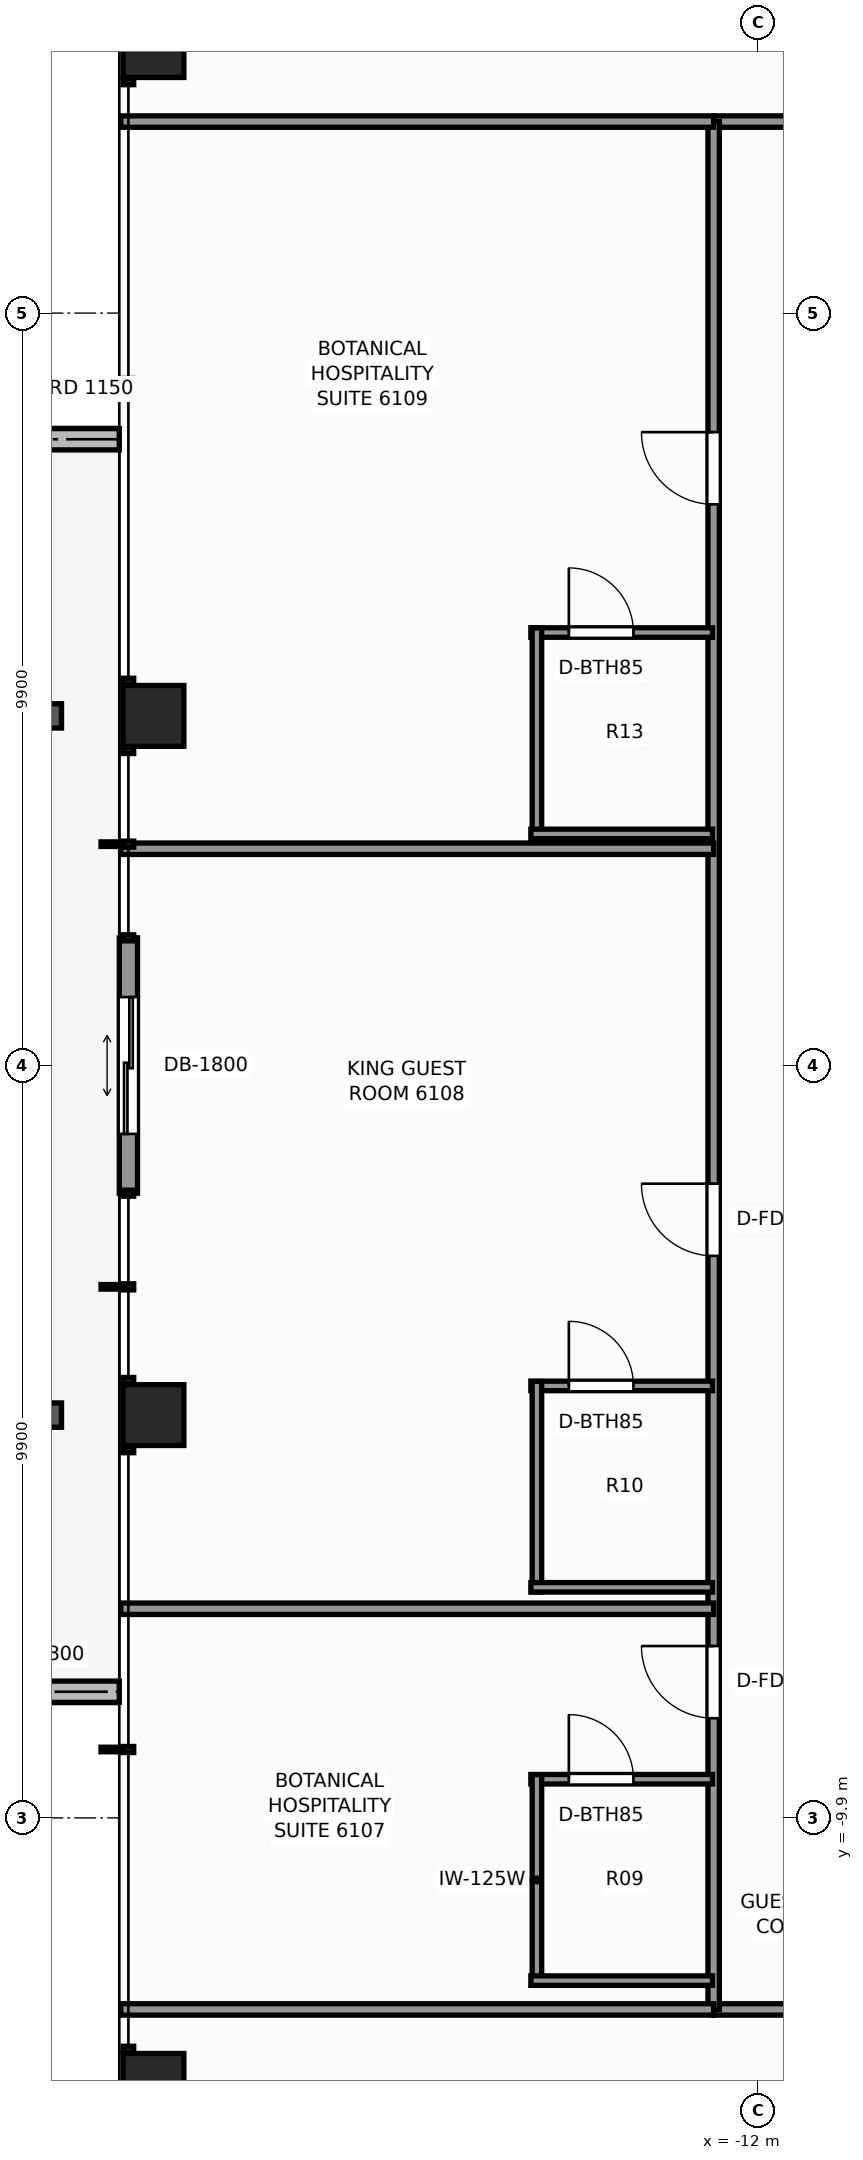
"""IFC4 building model, lengths in metres.
Left out: names, types, materials, properties, quantities, classifications, styles, units other than length and angle.
Written with IfcOpenShell. Run it as: python <this file> out.ifc"""

import sys

from ifc_helpers import new_model, si_unit, direction, frame, frame_2d, origin, origin_2d, place, context, subcontext, project, spatial, rectangle, extrude, element, fill, save


model = new_model("IFC4")
c1 = context("Model", 3, precision=1e-05, world=origin(), true_north=direction((0.0, 1.0)))
c2 = subcontext(c1, "Body", "Model", "MODEL_VIEW")
j1 = project(units=[si_unit("LENGTHUNIT", "METRE"), si_unit("PLANEANGLEUNIT", "RADIAN")], contexts=[c1])
p1 = place(None, origin())
s1 = spatial("IfcSite", under=j1, at=p1, CompositionType="ELEMENT")
p2 = place(p1, origin())
s2 = spatial("IfcBuilding", under=s1, at=p2, CompositionType="ELEMENT")
p3 = place(p2, frame((0.0, 0.0, 209.7)))
s3 = spatial("IfcBuildingStorey", under=s2, at=p3, CompositionType="ELEMENT", Elevation=209.7)
for number, where, z_axis, x_axis in (
    (1, (-19.95, -13.4, 0.0), (0.0, 0.0, 1.0), (1.0, 0.0, 0.0)),
    (2, (-19.95, -4.6, 0.0), (0.0, 0.0, 1.0), (1.0, 0.0, 0.0)),
    (3, (-19.95, 4.6, 0.0), (0.0, 0.0, 1.0), (1.0, 0.0, 0.0)),
    (4, (-19.95, 13.4, 0.0), (0.0, 0.0, 1.0), (1.0, 0.0, 0.0)),
):
    element("IfcColumn", number, at=place(p3, frame(where, z_axis=z_axis, x_axis=x_axis)), inside=s3, PredefinedType="COLUMN", context=c2, shape_type="SweptSolid", body=[
        extrude(rectangle(XDim=0.8, YDim=0.8, at=origin_2d()), origin(), (0.0, 0.0, 1.0), 3.3),
    ])
p4 = place(p3, frame((-22.406, -8.24, -0.04), z_axis=(0.0, 0.0, 1.0), x_axis=(1.0, 0.0, 0.0)))
e5 = element("IfcWall", 5, at=p4, inside=s3, PredefinedType="PARAPET", context=c2, shape_type="SweptSolid", body=[
    extrude(rectangle(XDim=2.006, YDim=0.28, at=frame_2d((1.003, 0.0))), origin(), (0.0, 0.0, 1.0), 0.42),
])
p5 = place(p3, frame((-20.4, 8.24, -0.04), z_axis=(0.0, 0.0, 1.0), x_axis=(-1.0, 0.0, 0.0)))
e6 = element("IfcWall", 6, at=p5, inside=s3, PredefinedType="PARAPET", context=c2, shape_type="SweptSolid", body=[
    extrude(rectangle(XDim=1.26, YDim=0.28, at=frame_2d((0.63, 0.0))), origin(), (0.0, 0.0, 1.0), 0.42),
])
p6 = place(p3, frame((-20.28, -1.68, 0.0), z_axis=(0.0, 0.0, 1.0), x_axis=(0.0, 1.0, 0.0)))
e7 = element("IfcWall", 7, at=p6, inside=s3, PredefinedType="STANDARD", context=c2, shape_type="SweptSolid", body=[
    extrude(rectangle(XDim=3.36, YDim=0.24, at=frame_2d((1.68, 0.0))), origin(), (0.0, 0.0, 1.0), 3.08),
])
p7 = place(p6, frame((0.78, 0.0, 0.0)))
e8 = element("IfcOpeningElement", 8, at=p7, cuts=e7, PredefinedType="OPENING", context=c2, shape_type="SweptSolid", body=[
    extrude(rectangle(XDim=1.8, YDim=2.2, at=frame_2d((0.9, 1.1))), frame((0.0, 0.13, 0.0), z_axis=(0.0, -1.0, 0.0), x_axis=(1.0, 0.0, 0.0)), (0.0, 0.0, 1.0), 0.26),
])
p8 = place(p3, frame((-12.58, -12.42, 0.0), z_axis=(0.0, 0.0, 1.0), x_axis=(1.0, 0.0, 0.0)))
e9 = element("IfcWall", 9, at=p8, inside=s3, PredefinedType="PARTITIONING", context=c2, shape_type="SweptSolid", body=[
    extrude(rectangle(XDim=25.16, YDim=0.15, at=frame_2d((12.58, 0.0))), origin(), (0.0, 0.0, 1.0), 2.369),
])
p9 = place(p8, frame((4.595, 0.0, 0.0)))
e10 = element("IfcOpeningElement", 10, at=p9, cuts=e9, PredefinedType="OPENING", context=c2, shape_type="SweptSolid", body=[
    extrude(rectangle(XDim=0.9, YDim=2.06, at=frame_2d((0.45, 1.03))), frame((0.0, 0.085, 0.0), z_axis=(0.0, -1.0, 0.0), x_axis=(1.0, 0.0, 0.0)), (0.0, 0.0, 1.0), 0.17),
])
p10 = place(p8, frame((10.1, 0.0, 0.0)))
e11 = element("IfcOpeningElement", 11, at=p10, cuts=e9, PredefinedType="OPENING", context=c2, shape_type="SweptSolid", body=[
    extrude(rectangle(XDim=0.9, YDim=2.06, at=frame_2d((0.45, 1.03))), frame((0.0, 0.085, 0.0), z_axis=(0.0, -1.0, 0.0), x_axis=(1.0, 0.0, 0.0)), (0.0, 0.0, 1.0), 0.17),
])
p11 = place(p8, frame((20.079, 0.0, 0.0)))
e12 = element("IfcOpeningElement", 12, at=p11, cuts=e9, PredefinedType="OPENING", context=c2, shape_type="SweptSolid", body=[
    extrude(rectangle(XDim=0.9, YDim=2.06, at=frame_2d((0.45, 1.03))), frame((0.0, 0.085, 0.0), z_axis=(0.0, -1.0, 0.0), x_axis=(1.0, 0.0, 0.0)), (0.0, 0.0, 1.0), 0.17),
])
p12 = place(p3, frame((-12.58, 12.42, 0.0), z_axis=(0.0, 0.0, 1.0), x_axis=(1.0, 0.0, 0.0)))
e13 = element("IfcWall", 13, at=p12, inside=s3, PredefinedType="PARTITIONING", context=c2, shape_type="SweptSolid", body=[
    extrude(rectangle(XDim=25.16, YDim=0.15, at=frame_2d((12.58, 0.0))), origin(), (0.0, 0.0, 1.0), 2.369),
])
p13 = place(p12, frame((4.443, 0.0, 0.0)))
e14 = element("IfcOpeningElement", 14, at=p13, cuts=e13, PredefinedType="OPENING", context=c2, shape_type="SweptSolid", body=[
    extrude(rectangle(XDim=0.9, YDim=2.06, at=frame_2d((0.45, 1.03))), frame((0.0, 0.085, 0.0), z_axis=(0.0, -1.0, 0.0), x_axis=(1.0, 0.0, 0.0)), (0.0, 0.0, 1.0), 0.17),
])
p14 = place(p12, frame((14.135, 0.0, 0.0)))
e15 = element("IfcOpeningElement", 15, at=p14, cuts=e13, PredefinedType="OPENING", context=c2, shape_type="SweptSolid", body=[
    extrude(rectangle(XDim=0.95, YDim=2.06, at=frame_2d((0.475, 1.03))), frame((0.0, 0.085, 0.0), z_axis=(0.0, -1.0, 0.0), x_axis=(1.0, 0.0, 0.0)), (0.0, 0.0, 1.0), 0.17),
])
p15 = place(p12, frame((19.817, 0.0, 0.0)))
e16 = element("IfcOpeningElement", 16, at=p15, cuts=e13, PredefinedType="OPENING", context=c2, shape_type="SweptSolid", body=[
    extrude(rectangle(XDim=0.9, YDim=2.06, at=frame_2d((0.45, 1.03))), frame((0.0, 0.085, 0.0), z_axis=(0.0, -1.0, 0.0), x_axis=(1.0, 0.0, 0.0)), (0.0, 0.0, 1.0), 0.17),
])
p16 = place(p3, frame((-12.58, -12.42, 0.0), z_axis=(0.0, 0.0, 1.0), x_axis=(0.0, 1.0, 0.0)))
e17 = element("IfcWall", 17, at=p16, inside=s3, PredefinedType="PARTITIONING", context=c2, shape_type="SweptSolid", body=[
    extrude(rectangle(XDim=24.84, YDim=0.15, at=frame_2d((12.42, 0.0))), origin(), (0.0, 0.0, 1.0), 2.369),
])
p17 = place(p16, frame((3.831, 0.0, 0.0)))
e18 = element("IfcOpeningElement", 18, at=p17, cuts=e17, PredefinedType="OPENING", context=c2, shape_type="SweptSolid", body=[
    extrude(rectangle(XDim=0.95, YDim=2.06, at=frame_2d((0.475, 1.03))), frame((0.0, 0.085, 0.0), z_axis=(0.0, -1.0, 0.0), x_axis=(1.0, 0.0, 0.0)), (0.0, 0.0, 1.0), 0.17),
])
p18 = place(p16, frame((9.915, 0.0, 0.0)))
e19 = element("IfcOpeningElement", 19, at=p18, cuts=e17, PredefinedType="OPENING", context=c2, shape_type="SweptSolid", body=[
    extrude(rectangle(XDim=0.95, YDim=2.06, at=frame_2d((0.475, 1.03))), frame((0.0, 0.085, 0.0), z_axis=(0.0, -1.0, 0.0), x_axis=(1.0, 0.0, 0.0)), (0.0, 0.0, 1.0), 0.17),
])
p19 = place(p16, frame((19.803, 0.0, 0.0)))
e20 = element("IfcOpeningElement", 20, at=p19, cuts=e17, PredefinedType="OPENING", context=c2, shape_type="SweptSolid", body=[
    extrude(rectangle(XDim=0.95, YDim=2.06, at=frame_2d((0.475, 1.03))), frame((0.0, 0.085, 0.0), z_axis=(0.0, -1.0, 0.0), x_axis=(1.0, 0.0, 0.0)), (0.0, 0.0, 1.0), 0.17),
])
for number, where, z_axis, x_axis in (
    (21, (-20.38, -12.42, 0.0), (0.0, 0.0, 1.0), (1.0, 0.0, 0.0)),
    (22, (-20.38, 12.42, 0.0), (0.0, 0.0, 1.0), (1.0, 0.0, 0.0)),
):
    element("IfcWall", number, at=place(p3, frame(where, z_axis=z_axis, x_axis=x_axis)), inside=s3, PredefinedType="PARTITIONING", context=c2, shape_type="SweptSolid", body=[
        extrude(rectangle(XDim=7.8, YDim=0.15, at=frame_2d((3.9, 0.0))), origin(), (0.0, 0.0, 1.0), 2.369),
    ])
p20 = place(p3, frame((-20.38, -7.148, 0.0), z_axis=(0.0, 0.0, 1.0), x_axis=(1.0, 0.0, 0.0)))
e23 = element("IfcWall", 23, at=p20, inside=s3, PredefinedType="PARTITIONING", context=c2, shape_type="SweptSolid", body=[
    extrude(rectangle(XDim=7.8, YDim=0.15, at=frame_2d((3.9, 0.0))), origin(), (0.0, 0.0, 1.0), 2.453),
])
p21 = place(p3, frame((-14.985, -9.391, 0.0), z_axis=(0.0, 0.0, 1.0), x_axis=(1.0, 0.0, 0.0)))
e24 = element("IfcWall", 24, at=p21, inside=s3, PredefinedType="PARTITIONING", context=c2, shape_type="SweptSolid", body=[
    extrude(rectangle(XDim=2.39, YDim=0.125, at=frame_2d((1.195, 0.0))), origin(), (0.0, 0.0, 1.0), 3.08),
])
p22 = place(p21, frame((0.5, 0.0, 0.0)))
e25 = element("IfcOpeningElement", 25, at=p22, cuts=e24, PredefinedType="OPENING", context=c2, shape_type="SweptSolid", body=[
    extrude(rectangle(XDim=0.85, YDim=2.03, at=frame_2d((0.425, 1.015))), frame((0.0, 0.073, 0.0), z_axis=(0.0, -1.0, 0.0), x_axis=(1.0, 0.0, 0.0)), (0.0, 0.0, 1.0), 0.145),
])
p23 = place(p3, frame((-14.905, -12.101, 0.0), z_axis=(0.0, 0.0, 1.0), x_axis=(0.0, 1.0, 0.0)))
e26 = element("IfcWall", 26, at=p23, inside=s3, PredefinedType="PARTITIONING", context=c2, shape_type="SweptSolid", body=[
    extrude(rectangle(XDim=2.77, YDim=0.125, at=frame_2d((1.385, 0.0))), origin(), (0.0, 0.0, 1.0), 2.369),
])
p24 = place(p3, frame((-14.985, -12.041, 0.0), z_axis=(0.0, 0.0, 1.0), x_axis=(1.0, 0.0, 0.0)))
e27 = element("IfcWall", 27, at=p24, inside=s3, PredefinedType="PARTITIONING", context=c2, shape_type="SweptSolid", body=[
    extrude(rectangle(XDim=2.39, YDim=0.125, at=frame_2d((1.195, 0.0))), origin(), (0.0, 0.0, 1.0), 3.08),
])
p25 = place(p3, frame((-20.38, 2.852, 0.0), z_axis=(0.0, 0.0, 1.0), x_axis=(1.0, 0.0, 0.0)))
e28 = element("IfcWall", 28, at=p25, inside=s3, PredefinedType="PARTITIONING", context=c2, shape_type="SweptSolid", body=[
    extrude(rectangle(XDim=7.8, YDim=0.15, at=frame_2d((3.9, 0.0))), origin(), (0.0, 0.0, 1.0), 2.453),
])
p26 = place(p3, frame((-14.985, -4.216, 0.0), z_axis=(0.0, 0.0, 1.0), x_axis=(1.0, 0.0, 0.0)))
e29 = element("IfcWall", 29, at=p26, inside=s3, PredefinedType="PARTITIONING", context=c2, shape_type="SweptSolid", body=[
    extrude(rectangle(XDim=2.39, YDim=0.125, at=frame_2d((1.195, 0.0))), origin(), (0.0, 0.0, 1.0), 3.08),
])
p27 = place(p26, frame((0.5, 0.0, 0.0)))
e30 = element("IfcOpeningElement", 30, at=p27, cuts=e29, PredefinedType="OPENING", context=c2, shape_type="SweptSolid", body=[
    extrude(rectangle(XDim=0.85, YDim=2.03, at=frame_2d((0.425, 1.015))), frame((0.0, 0.073, 0.0), z_axis=(0.0, -1.0, 0.0), x_axis=(1.0, 0.0, 0.0)), (0.0, 0.0, 1.0), 0.145),
])
p28 = place(p3, frame((-14.905, -6.926, 0.0), z_axis=(0.0, 0.0, 1.0), x_axis=(0.0, 1.0, 0.0)))
e31 = element("IfcWall", 31, at=p28, inside=s3, PredefinedType="PARTITIONING", context=c2, shape_type="SweptSolid", body=[
    extrude(rectangle(XDim=2.77, YDim=0.125, at=frame_2d((1.385, 0.0))), origin(), (0.0, 0.0, 1.0), 2.369),
])
p29 = place(p3, frame((-14.985, -6.866, 0.0), z_axis=(0.0, 0.0, 1.0), x_axis=(1.0, 0.0, 0.0)))
e32 = element("IfcWall", 32, at=p29, inside=s3, PredefinedType="PARTITIONING", context=c2, shape_type="SweptSolid", body=[
    extrude(rectangle(XDim=2.39, YDim=0.125, at=frame_2d((1.195, 0.0))), origin(), (0.0, 0.0, 1.0), 3.08),
])
p30 = place(p3, frame((-14.985, 5.697, 0.0), z_axis=(0.0, 0.0, 1.0), x_axis=(1.0, 0.0, 0.0)))
e33 = element("IfcWall", 33, at=p30, inside=s3, PredefinedType="PARTITIONING", context=c2, shape_type="SweptSolid", body=[
    extrude(rectangle(XDim=2.39, YDim=0.125, at=frame_2d((1.195, 0.0))), origin(), (0.0, 0.0, 1.0), 3.08),
])
p31 = place(p30, frame((0.5, 0.0, 0.0)))
e34 = element("IfcOpeningElement", 34, at=p31, cuts=e33, PredefinedType="OPENING", context=c2, shape_type="SweptSolid", body=[
    extrude(rectangle(XDim=0.85, YDim=2.03, at=frame_2d((0.425, 1.015))), frame((0.0, 0.073, 0.0), z_axis=(0.0, -1.0, 0.0), x_axis=(1.0, 0.0, 0.0)), (0.0, 0.0, 1.0), 0.145),
])
p32 = place(p3, frame((-14.905, 2.987, 0.0), z_axis=(0.0, 0.0, 1.0), x_axis=(0.0, 1.0, 0.0)))
e35 = element("IfcWall", 35, at=p32, inside=s3, PredefinedType="PARTITIONING", context=c2, shape_type="SweptSolid", body=[
    extrude(rectangle(XDim=2.77, YDim=0.125, at=frame_2d((1.385, 0.0))), origin(), (0.0, 0.0, 1.0), 2.369),
])
p33 = place(p3, frame((-14.985, 3.047, 0.0), z_axis=(0.0, 0.0, 1.0), x_axis=(1.0, 0.0, 0.0)))
e36 = element("IfcWall", 36, at=p33, inside=s3, PredefinedType="PARTITIONING", context=c2, shape_type="SweptSolid", body=[
    extrude(rectangle(XDim=2.39, YDim=0.125, at=frame_2d((1.195, 0.0))), origin(), (0.0, 0.0, 1.0), 3.08),
])
p34 = place(p7, origin())
e37 = element("IfcDoor", 37, at=p34, inside=s3, OperationType="DOUBLE_DOOR_SLIDING", PredefinedType="DOOR", context=c2, shape_type="SweptSolid", body=[
    extrude(rectangle(XDim=1.8, YDim=2.2, at=frame_2d((0.9, 1.1))), frame((0.0, 0.025, 0.0), z_axis=(0.0, -1.0, 0.0), x_axis=(1.0, 0.0, 0.0)), (0.0, 0.0, 1.0), 0.05),
])
fill(e8, e37)
p35 = place(p22, origin())
e38 = element("IfcDoor", 38, at=p35, inside=s3, OperationType="SINGLE_SWING_LEFT", PredefinedType="DOOR", context=c2, shape_type="SweptSolid", body=[
    extrude(rectangle(XDim=0.85, YDim=2.03, at=frame_2d((0.425, 1.015))), frame((0.0, 0.025, 0.0), z_axis=(0.0, -1.0, 0.0), x_axis=(1.0, 0.0, 0.0)), (0.0, 0.0, 1.0), 0.05),
])
fill(e25, e38)
p36 = place(p17, origin())
e39 = element("IfcDoor", 39, at=p36, inside=s3, OperationType="SINGLE_SWING_RIGHT", PredefinedType="DOOR", context=c2, shape_type="SweptSolid", body=[
    extrude(rectangle(XDim=0.95, YDim=2.06, at=frame_2d((0.475, 1.03))), frame((0.0, 0.025, 0.0), z_axis=(0.0, -1.0, 0.0), x_axis=(1.0, 0.0, 0.0)), (0.0, 0.0, 1.0), 0.05),
])
fill(e18, e39)
p37 = place(p27, origin())
e40 = element("IfcDoor", 40, at=p37, inside=s3, OperationType="SINGLE_SWING_LEFT", PredefinedType="DOOR", context=c2, shape_type="SweptSolid", body=[
    extrude(rectangle(XDim=0.85, YDim=2.03, at=frame_2d((0.425, 1.015))), frame((0.0, 0.025, 0.0), z_axis=(0.0, -1.0, 0.0), x_axis=(1.0, 0.0, 0.0)), (0.0, 0.0, 1.0), 0.05),
])
fill(e30, e40)
p38 = place(p18, origin())
e41 = element("IfcDoor", 41, at=p38, inside=s3, OperationType="SINGLE_SWING_RIGHT", PredefinedType="DOOR", context=c2, shape_type="SweptSolid", body=[
    extrude(rectangle(XDim=0.95, YDim=2.06, at=frame_2d((0.475, 1.03))), frame((0.0, 0.025, 0.0), z_axis=(0.0, -1.0, 0.0), x_axis=(1.0, 0.0, 0.0)), (0.0, 0.0, 1.0), 0.05),
])
fill(e19, e41)
p39 = place(p31, origin())
e42 = element("IfcDoor", 42, at=p39, inside=s3, OperationType="SINGLE_SWING_LEFT", PredefinedType="DOOR", context=c2, shape_type="SweptSolid", body=[
    extrude(rectangle(XDim=0.85, YDim=2.03, at=frame_2d((0.425, 1.015))), frame((0.0, 0.025, 0.0), z_axis=(0.0, -1.0, 0.0), x_axis=(1.0, 0.0, 0.0)), (0.0, 0.0, 1.0), 0.05),
])
fill(e34, e42)
p40 = place(p19, origin())
e43 = element("IfcDoor", 43, at=p40, inside=s3, OperationType="SINGLE_SWING_RIGHT", PredefinedType="DOOR", context=c2, shape_type="SweptSolid", body=[
    extrude(rectangle(XDim=0.95, YDim=2.06, at=frame_2d((0.475, 1.03))), frame((0.0, 0.025, 0.0), z_axis=(0.0, -1.0, 0.0), x_axis=(1.0, 0.0, 0.0)), (0.0, 0.0, 1.0), 0.05),
])
fill(e20, e43)
save(model, sys.argv[1])
